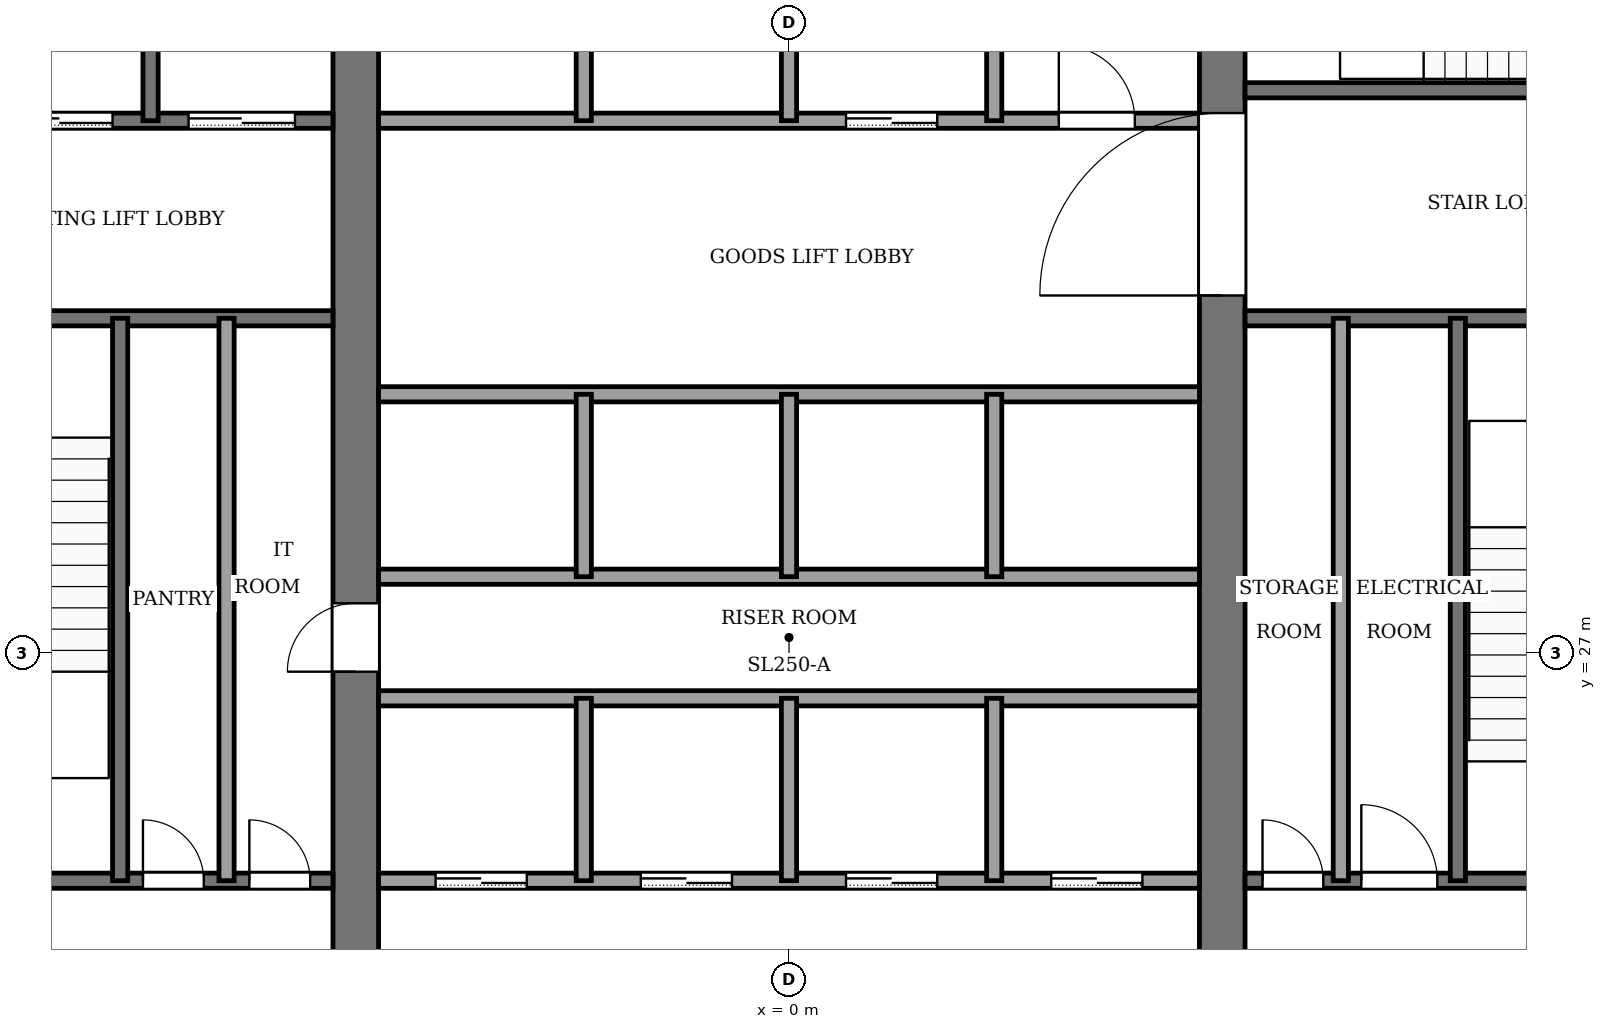
"""IFC4 building model, lengths in metres.
Left out: names, types, materials, properties, quantities, classifications, styles, units other than length and angle.
Written with IfcOpenShell. Run it as: python <this file> out.ifc"""

import sys

from ifc_helpers import new_model, si_unit, direction, frame, frame_2d, origin, place, context, subcontext, project, spatial, rectangle, extrude, element, fill, save


model = new_model("IFC4")
c1 = context("Model", 3, precision=1e-05, world=origin(), true_north=direction((0.0, 1.0)))
c2 = subcontext(c1, "Body", "Model", "MODEL_VIEW")
j1 = project(units=[si_unit("LENGTHUNIT", "METRE"), si_unit("PLANEANGLEUNIT", "RADIAN")], contexts=[c1])
p1 = place(None, origin())
s1 = spatial("IfcSite", under=j1, at=p1, CompositionType="ELEMENT")
p2 = place(p1, origin())
s2 = spatial("IfcBuilding", under=s1, at=p2, CompositionType="ELEMENT")
p3 = place(p2, frame((0.0, 0.0, 26.0)))
s3 = spatial("IfcBuildingStorey", under=s2, at=p3, CompositionType="ELEMENT", Elevation=26.0)
p4 = place(p3, frame((-5.7, 18.4, -0.13), z_axis=(0.0, 0.0, 1.0), x_axis=(0.0, 1.0, 0.0)))
e1 = element("IfcWall", 1, at=p4, inside=s3, PredefinedType="SHEAR", context=c2, shape_type="SweptSolid", body=[
    extrude(rectangle(XDim=19.2, YDim=0.6, at=frame_2d((9.6, 0.0))), origin(), (0.0, 0.0, 1.0), 4.0),
])
p5 = place(p4, frame((8.35, 0.0, 0.13)))
e2 = element("IfcOpeningElement", 2, at=p5, cuts=e1, PredefinedType="OPENING", context=c2, shape_type="SweptSolid", body=[
    extrude(rectangle(XDim=0.9, YDim=2.1, at=frame_2d((0.45, 1.05))), frame((0.0, 0.31, 0.0), z_axis=(0.0, -1.0, 0.0), x_axis=(1.0, 0.0, 0.0)), (0.0, 0.0, 1.0), 0.62),
])
p6 = place(p3, frame((5.7, 18.4, -0.13), z_axis=(0.0, 0.0, 1.0), x_axis=(0.0, 1.0, 0.0)))
e3 = element("IfcWall", 3, at=p6, inside=s3, PredefinedType="SHEAR", context=c2, shape_type="SweptSolid", body=[
    extrude(rectangle(XDim=19.2, YDim=0.6, at=frame_2d((9.6, 0.0))), origin(), (0.0, 0.0, 1.0), 4.0),
])
p7 = place(p6, frame((13.3, 0.0, 0.13)))
e4 = element("IfcOpeningElement", 4, at=p7, cuts=e3, PredefinedType="OPENING", context=c2, shape_type="SweptSolid", body=[
    extrude(rectangle(XDim=2.4, YDim=2.4, at=frame_2d((1.2, 1.2))), frame((0.0, 0.31, 0.0), z_axis=(0.0, -1.0, 0.0), x_axis=(1.0, 0.0, 0.0)), (0.0, 0.0, 1.0), 0.62),
])
p8 = place(p3, frame((-12.6, 24.0, 0.0), z_axis=(0.0, 0.0, 1.0), x_axis=(1.0, 0.0, 0.0)))
e5 = element("IfcWall", 5, at=p8, inside=s3, PredefinedType="PARTITIONING", context=c2, shape_type="SweptSolid", body=[
    extrude(rectangle(XDim=6.6, YDim=0.2, at=frame_2d((3.3, 0.0))), origin(), (0.0, 0.0, 1.0), 3.87),
])
p9 = place(p8, frame((4.1, 0.0, 0.0)))
e6 = element("IfcOpeningElement", 6, at=p9, cuts=e5, PredefinedType="OPENING", context=c2, shape_type="SweptSolid", body=[
    extrude(rectangle(XDim=0.8, YDim=2.1, at=frame_2d((0.4, 1.05))), frame((0.0, 0.11, 0.0), z_axis=(0.0, -1.0, 0.0), x_axis=(1.0, 0.0, 0.0)), (0.0, 0.0, 1.0), 0.22),
])
p10 = place(p8, frame((5.5, 0.0, 0.0)))
e7 = element("IfcOpeningElement", 7, at=p10, cuts=e5, PredefinedType="OPENING", context=c2, shape_type="SweptSolid", body=[
    extrude(rectangle(XDim=0.8, YDim=2.1, at=frame_2d((0.4, 1.05))), frame((0.0, 0.11, 0.0), z_axis=(0.0, -1.0, 0.0), x_axis=(1.0, 0.0, 0.0)), (0.0, 0.0, 1.0), 0.22),
])
p11 = place(p3, frame((-5.4, 24.0, 0.0), z_axis=(0.0, 0.0, 1.0), x_axis=(1.0, 0.0, 0.0)))
e8 = element("IfcWall", 8, at=p11, inside=s3, PredefinedType="PARTITIONING", context=c2, shape_type="SweptSolid", body=[
    extrude(rectangle(XDim=10.8, YDim=0.2, at=frame_2d((5.4, 0.0))), origin(), (0.0, 0.0, 1.0), 3.87),
])
p12 = place(p11, frame((0.75, 0.0, 0.0)))
e9 = element("IfcOpeningElement", 9, at=p12, cuts=e8, PredefinedType="OPENING", context=c2, shape_type="SweptSolid", body=[
    extrude(rectangle(XDim=1.2, YDim=2.2, at=frame_2d((0.6, 1.1))), frame((0.0, 0.11, 0.0), z_axis=(0.0, -1.0, 0.0), x_axis=(1.0, 0.0, 0.0)), (0.0, 0.0, 1.0), 0.22),
])
p13 = place(p11, frame((3.45, 0.0, 0.0)))
e10 = element("IfcOpeningElement", 10, at=p13, cuts=e8, PredefinedType="OPENING", context=c2, shape_type="SweptSolid", body=[
    extrude(rectangle(XDim=1.2, YDim=2.2, at=frame_2d((0.6, 1.1))), frame((0.0, 0.11, 0.0), z_axis=(0.0, -1.0, 0.0), x_axis=(1.0, 0.0, 0.0)), (0.0, 0.0, 1.0), 0.22),
])
p14 = place(p11, frame((6.15, 0.0, 0.0)))
e11 = element("IfcOpeningElement", 11, at=p14, cuts=e8, PredefinedType="OPENING", context=c2, shape_type="SweptSolid", body=[
    extrude(rectangle(XDim=1.2, YDim=2.2, at=frame_2d((0.6, 1.1))), frame((0.0, 0.11, 0.0), z_axis=(0.0, -1.0, 0.0), x_axis=(1.0, 0.0, 0.0)), (0.0, 0.0, 1.0), 0.22),
])
p15 = place(p11, frame((8.85, 0.0, 0.0)))
e12 = element("IfcOpeningElement", 12, at=p15, cuts=e8, PredefinedType="OPENING", context=c2, shape_type="SweptSolid", body=[
    extrude(rectangle(XDim=1.2, YDim=2.2, at=frame_2d((0.6, 1.1))), frame((0.0, 0.11, 0.0), z_axis=(0.0, -1.0, 0.0), x_axis=(1.0, 0.0, 0.0)), (0.0, 0.0, 1.0), 0.22),
])
p16 = place(p3, frame((6.0, 24.0, 0.0), z_axis=(0.0, 0.0, 1.0), x_axis=(1.0, 0.0, 0.0)))
e13 = element("IfcWall", 13, at=p16, inside=s3, PredefinedType="PARTITIONING", context=c2, shape_type="SweptSolid", body=[
    extrude(rectangle(XDim=6.6, YDim=0.2, at=frame_2d((3.3, 0.0))), origin(), (0.0, 0.0, 1.0), 3.87),
])
p17 = place(p16, frame((0.23, 0.0, 0.0)))
e14 = element("IfcOpeningElement", 14, at=p17, cuts=e13, PredefinedType="OPENING", context=c2, shape_type="SweptSolid", body=[
    extrude(rectangle(XDim=0.8, YDim=2.1, at=frame_2d((0.4, 1.05))), frame((0.0, 0.11, 0.0), z_axis=(0.0, -1.0, 0.0), x_axis=(1.0, 0.0, 0.0)), (0.0, 0.0, 1.0), 0.22),
])
p18 = place(p16, frame((1.53, 0.0, 0.0)))
e15 = element("IfcOpeningElement", 15, at=p18, cuts=e13, PredefinedType="OPENING", context=c2, shape_type="SweptSolid", body=[
    extrude(rectangle(XDim=1.0, YDim=2.1, at=frame_2d((0.5, 1.05))), frame((0.0, 0.11, 0.0), z_axis=(0.0, -1.0, 0.0), x_axis=(1.0, 0.0, 0.0)), (0.0, 0.0, 1.0), 0.22),
])
p19 = place(p16, frame((4.4, 0.0, 0.0)))
e16 = element("IfcOpeningElement", 16, at=p19, cuts=e13, PredefinedType="OPENING", context=c2, shape_type="SweptSolid", body=[
    extrude(rectangle(XDim=1.2, YDim=2.2, at=frame_2d((0.6, 1.1))), frame((0.0, 0.11, 0.0), z_axis=(0.0, -1.0, 0.0), x_axis=(1.0, 0.0, 0.0)), (0.0, 0.0, 1.0), 0.22),
])
for number, where, z_axis, x_axis in (
    (17, (-5.4, 26.4, 0.0), (0.0, 0.0, 1.0), (1.0, 0.0, 0.0)),
    (18, (-5.4, 28.0, 0.0), (0.0, 0.0, 1.0), (1.0, 0.0, 0.0)),
    (19, (-5.4, 30.4, 0.0), (0.0, 0.0, 1.0), (1.0, 0.0, 0.0)),
):
    element("IfcWall", number, at=place(p3, frame(where, z_axis=z_axis, x_axis=x_axis)), inside=s3, PredefinedType="PARTITIONING", context=c2, shape_type="SweptSolid", body=[
        extrude(rectangle(XDim=10.8, YDim=0.2, at=frame_2d((5.4, 0.0))), origin(), (0.0, 0.0, 1.0), 3.87),
    ])
p20 = place(p3, frame((-12.6, 31.4, 0.0), z_axis=(0.0, 0.0, 1.0), x_axis=(1.0, 0.0, 0.0)))
e20 = element("IfcWall", 20, at=p20, inside=s3, PredefinedType="PARTITIONING", context=c2, shape_type="SweptSolid", body=[
    extrude(rectangle(XDim=6.6, YDim=0.2, at=frame_2d((3.3, 0.0))), origin(), (0.0, 0.0, 1.0), 3.87),
])
p21 = place(p20, frame((1.0, 0.0, 0.0)))
e21 = element("IfcOpeningElement", 21, at=p21, cuts=e20, PredefinedType="OPENING", context=c2, shape_type="SweptSolid", body=[
    extrude(rectangle(XDim=1.2, YDim=2.2, at=frame_2d((0.6, 1.1))), frame((0.0, 0.11, 0.0), z_axis=(0.0, -1.0, 0.0), x_axis=(1.0, 0.0, 0.0)), (0.0, 0.0, 1.0), 0.22),
])
p22 = place(p3, frame((6.0, 31.4, 0.0), z_axis=(0.0, 0.0, 1.0), x_axis=(1.0, 0.0, 0.0)))
e22 = element("IfcWall", 22, at=p22, inside=s3, PredefinedType="PARTITIONING", context=c2, shape_type="SweptSolid", body=[
    extrude(rectangle(XDim=6.6, YDim=0.2, at=frame_2d((3.3, 0.0))), origin(), (0.0, 0.0, 1.0), 3.87),
])
p23 = place(p3, frame((-12.6, 34.0, 0.0), z_axis=(0.0, 0.0, 1.0), x_axis=(1.0, 0.0, 0.0)))
e23 = element("IfcWall", 23, at=p23, inside=s3, PredefinedType="PARTITIONING", context=c2, shape_type="SweptSolid", body=[
    extrude(rectangle(XDim=6.6, YDim=0.2, at=frame_2d((3.3, 0.0))), origin(), (0.0, 0.0, 1.0), 3.87),
])
p24 = place(p23, frame((4.7, 0.0, 0.0)))
e24 = element("IfcOpeningElement", 24, at=p24, cuts=e23, PredefinedType="OPENING", context=c2, shape_type="SweptSolid", body=[
    extrude(rectangle(XDim=1.4, YDim=2.2, at=frame_2d((0.7, 1.1))), frame((0.0, 0.11, 0.0), z_axis=(0.0, -1.0, 0.0), x_axis=(1.0, 0.0, 0.0)), (0.0, 0.0, 1.0), 0.22),
])
p25 = place(p23, frame((2.3, 0.0, 0.0)))
e25 = element("IfcOpeningElement", 25, at=p25, cuts=e23, PredefinedType="OPENING", context=c2, shape_type="SweptSolid", body=[
    extrude(rectangle(XDim=1.4, YDim=2.2, at=frame_2d((0.7, 1.1))), frame((0.0, 0.11, 0.0), z_axis=(0.0, -1.0, 0.0), x_axis=(1.0, 0.0, 0.0)), (0.0, 0.0, 1.0), 0.22),
])
p26 = place(p23, frame((0.45, 0.0, 0.0)))
e26 = element("IfcOpeningElement", 26, at=p26, cuts=e23, PredefinedType="OPENING", context=c2, shape_type="SweptSolid", body=[
    extrude(rectangle(XDim=0.9, YDim=2.1, at=frame_2d((0.45, 1.05))), frame((0.0, 0.11, 0.0), z_axis=(0.0, -1.0, 0.0), x_axis=(1.0, 0.0, 0.0)), (0.0, 0.0, 1.0), 0.22),
])
p27 = place(p3, frame((-5.4, 34.0, 0.0), z_axis=(0.0, 0.0, 1.0), x_axis=(1.0, 0.0, 0.0)))
e27 = element("IfcWall", 27, at=p27, inside=s3, PredefinedType="PARTITIONING", context=c2, shape_type="SweptSolid", body=[
    extrude(rectangle(XDim=10.8, YDim=0.2, at=frame_2d((5.4, 0.0))), origin(), (0.0, 0.0, 1.0), 3.87),
])
p28 = place(p27, frame((6.15, 0.0, 0.0)))
e28 = element("IfcOpeningElement", 28, at=p28, cuts=e27, PredefinedType="OPENING", context=c2, shape_type="SweptSolid", body=[
    extrude(rectangle(XDim=1.2, YDim=2.2, at=frame_2d((0.6, 1.1))), frame((0.0, 0.11, 0.0), z_axis=(0.0, -1.0, 0.0), x_axis=(1.0, 0.0, 0.0)), (0.0, 0.0, 1.0), 0.22),
])
p29 = place(p27, frame((8.95, 0.0, 0.0)))
e29 = element("IfcOpeningElement", 29, at=p29, cuts=e27, PredefinedType="OPENING", context=c2, shape_type="SweptSolid", body=[
    extrude(rectangle(XDim=1.0, YDim=2.1, at=frame_2d((0.5, 1.05))), frame((0.0, 0.11, 0.0), z_axis=(0.0, -1.0, 0.0), x_axis=(1.0, 0.0, 0.0)), (0.0, 0.0, 1.0), 0.22),
])
p30 = place(p3, frame((6.0, 34.4, 0.0), z_axis=(0.0, 0.0, 1.0), x_axis=(1.0, 0.0, 0.0)))
e30 = element("IfcWall", 30, at=p30, inside=s3, PredefinedType="PARTITIONING", context=c2, shape_type="SweptSolid", body=[
    extrude(rectangle(XDim=6.6, YDim=0.2, at=frame_2d((3.3, 0.0))), origin(), (0.0, 0.0, 1.0), 3.87),
])
p31 = place(p30, frame((4.8, 0.0, 0.0)))
e31 = element("IfcOpeningElement", 31, at=p31, cuts=e30, PredefinedType="OPENING", context=c2, shape_type="SweptSolid", body=[
    extrude(rectangle(XDim=1.2, YDim=2.2, at=frame_2d((0.6, 1.1))), frame((0.0, 0.11, 0.0), z_axis=(0.0, -1.0, 0.0), x_axis=(1.0, 0.0, 0.0)), (0.0, 0.0, 1.0), 0.22),
])
p32 = place(p3, frame((-8.8, 24.0, 0.0), z_axis=(0.0, 0.0, 1.0), x_axis=(0.0, 1.0, 0.0)))
e32 = element("IfcWall", 32, at=p32, inside=s3, PredefinedType="PARTITIONING", context=c2, shape_type="SweptSolid", body=[
    extrude(rectangle(XDim=7.4, YDim=0.2, at=frame_2d((3.7, 0.0))), origin(), (0.0, 0.0, 1.0), 3.87),
])
p33 = place(p3, frame((-8.4, 34.0, 0.0), z_axis=(0.0, 0.0, 1.0), x_axis=(0.0, 1.0, 0.0)))
e33 = element("IfcWall", 33, at=p33, inside=s3, PredefinedType="PARTITIONING", context=c2, shape_type="SweptSolid", body=[
    extrude(rectangle(XDim=3.6, YDim=0.2, at=frame_2d((1.8, 0.0))), origin(), (0.0, 0.0, 1.0), 3.87),
])
p34 = place(p3, frame((-7.4, 24.0, 0.0), z_axis=(0.0, 0.0, 1.0), x_axis=(0.0, 1.0, 0.0)))
e34 = element("IfcWall", 34, at=p34, inside=s3, PredefinedType="PARTITIONING", context=c2, shape_type="SweptSolid", body=[
    extrude(rectangle(XDim=7.4, YDim=0.2, at=frame_2d((3.7, 0.0))), origin(), (0.0, 0.0, 1.0), 3.87),
])
for number, where, z_axis, x_axis in (
    (35, (-2.7, 24.0, 0.0), (0.0, 0.0, 1.0), (0.0, 1.0, 0.0)),
    (36, (-2.7, 28.0, 0.0), (0.0, 0.0, 1.0), (0.0, 1.0, 0.0)),
):
    element("IfcWall", number, at=place(p3, frame(where, z_axis=z_axis, x_axis=x_axis)), inside=s3, PredefinedType="PARTITIONING", context=c2, shape_type="SweptSolid", body=[
        extrude(rectangle(XDim=2.4, YDim=0.2, at=frame_2d((1.2, 0.0))), origin(), (0.0, 0.0, 1.0), 3.87),
    ])
p35 = place(p3, frame((-2.7, 34.0, 0.0), z_axis=(0.0, 0.0, 1.0), x_axis=(0.0, 1.0, 0.0)))
e37 = element("IfcWall", 37, at=p35, inside=s3, PredefinedType="PARTITIONING", context=c2, shape_type="SweptSolid", body=[
    extrude(rectangle(XDim=3.6, YDim=0.2, at=frame_2d((1.8, 0.0))), origin(), (0.0, 0.0, 1.0), 3.87),
])
for number, where, z_axis, x_axis in (
    (38, (0.0, 24.0, 0.0), (0.0, 0.0, 1.0), (0.0, 1.0, 0.0)),
    (39, (0.0, 28.0, 0.0), (0.0, 0.0, 1.0), (0.0, 1.0, 0.0)),
):
    element("IfcWall", number, at=place(p3, frame(where, z_axis=z_axis, x_axis=x_axis)), inside=s3, PredefinedType="PARTITIONING", context=c2, shape_type="SweptSolid", body=[
        extrude(rectangle(XDim=2.4, YDim=0.2, at=frame_2d((1.2, 0.0))), origin(), (0.0, 0.0, 1.0), 3.87),
    ])
p36 = place(p3, frame((0.0, 34.0, 0.0), z_axis=(0.0, 0.0, 1.0), x_axis=(0.0, 1.0, 0.0)))
e40 = element("IfcWall", 40, at=p36, inside=s3, PredefinedType="PARTITIONING", context=c2, shape_type="SweptSolid", body=[
    extrude(rectangle(XDim=3.6, YDim=0.2, at=frame_2d((1.8, 0.0))), origin(), (0.0, 0.0, 1.0), 3.87),
])
for number, where, z_axis, x_axis in (
    (41, (2.7, 24.0, 0.0), (0.0, 0.0, 1.0), (0.0, 1.0, 0.0)),
    (42, (2.7, 28.0, 0.0), (0.0, 0.0, 1.0), (0.0, 1.0, 0.0)),
):
    element("IfcWall", number, at=place(p3, frame(where, z_axis=z_axis, x_axis=x_axis)), inside=s3, PredefinedType="PARTITIONING", context=c2, shape_type="SweptSolid", body=[
        extrude(rectangle(XDim=2.4, YDim=0.2, at=frame_2d((1.2, 0.0))), origin(), (0.0, 0.0, 1.0), 3.87),
    ])
p37 = place(p3, frame((2.7, 34.0, 0.0), z_axis=(0.0, 0.0, 1.0), x_axis=(0.0, 1.0, 0.0)))
e43 = element("IfcWall", 43, at=p37, inside=s3, PredefinedType="PARTITIONING", context=c2, shape_type="SweptSolid", body=[
    extrude(rectangle(XDim=3.6, YDim=0.2, at=frame_2d((1.8, 0.0))), origin(), (0.0, 0.0, 1.0), 3.87),
])
for number, where, z_axis, x_axis in (
    (44, (7.26, 24.0, 0.0), (0.0, 0.0, 1.0), (0.0, 1.0, 0.0)),
    (45, (8.8, 24.0, 0.0), (0.0, 0.0, 1.0), (0.0, 1.0, 0.0)),
):
    element("IfcWall", number, at=place(p3, frame(where, z_axis=z_axis, x_axis=x_axis)), inside=s3, PredefinedType="PARTITIONING", context=c2, shape_type="SweptSolid", body=[
        extrude(rectangle(XDim=7.4, YDim=0.2, at=frame_2d((3.7, 0.0))), origin(), (0.0, 0.0, 1.0), 3.87),
    ])
p38 = place(p12, origin())
e46 = element("IfcDoor", 46, at=p38, inside=s3, OperationType="SLIDING_TO_LEFT", PredefinedType="DOOR", context=c2, shape_type="SweptSolid", body=[
    extrude(rectangle(XDim=1.2, YDim=2.2, at=frame_2d((0.6, 1.1))), frame((0.0, 0.025, 0.0), z_axis=(0.0, -1.0, 0.0), x_axis=(1.0, 0.0, 0.0)), (0.0, 0.0, 1.0), 0.05),
])
fill(e9, e46)
p39 = place(p13, origin())
e47 = element("IfcDoor", 47, at=p39, inside=s3, OperationType="SLIDING_TO_LEFT", PredefinedType="DOOR", context=c2, shape_type="SweptSolid", body=[
    extrude(rectangle(XDim=1.2, YDim=2.2, at=frame_2d((0.6, 1.1))), frame((0.0, 0.025, 0.0), z_axis=(0.0, -1.0, 0.0), x_axis=(1.0, 0.0, 0.0)), (0.0, 0.0, 1.0), 0.05),
])
fill(e10, e47)
p40 = place(p14, origin())
e48 = element("IfcDoor", 48, at=p40, inside=s3, OperationType="SLIDING_TO_LEFT", PredefinedType="DOOR", context=c2, shape_type="SweptSolid", body=[
    extrude(rectangle(XDim=1.2, YDim=2.2, at=frame_2d((0.6, 1.1))), frame((0.0, 0.025, 0.0), z_axis=(0.0, -1.0, 0.0), x_axis=(1.0, 0.0, 0.0)), (0.0, 0.0, 1.0), 0.05),
])
fill(e11, e48)
p41 = place(p15, origin())
e49 = element("IfcDoor", 49, at=p41, inside=s3, OperationType="SLIDING_TO_LEFT", PredefinedType="DOOR", context=c2, shape_type="SweptSolid", body=[
    extrude(rectangle(XDim=1.2, YDim=2.2, at=frame_2d((0.6, 1.1))), frame((0.0, 0.025, 0.0), z_axis=(0.0, -1.0, 0.0), x_axis=(1.0, 0.0, 0.0)), (0.0, 0.0, 1.0), 0.05),
])
fill(e12, e49)
p42 = place(p28, origin())
e50 = element("IfcDoor", 50, at=p42, inside=s3, OperationType="SLIDING_TO_LEFT", PredefinedType="DOOR", context=c2, shape_type="SweptSolid", body=[
    extrude(rectangle(XDim=1.2, YDim=2.2, at=frame_2d((0.6, 1.1))), frame((0.0, 0.025, 0.0), z_axis=(0.0, -1.0, 0.0), x_axis=(1.0, 0.0, 0.0)), (0.0, 0.0, 1.0), 0.05),
])
fill(e28, e50)
p43 = place(p24, origin())
e51 = element("IfcDoor", 51, at=p43, inside=s3, OperationType="SLIDING_TO_LEFT", PredefinedType="DOOR", context=c2, shape_type="SweptSolid", body=[
    extrude(rectangle(XDim=1.4, YDim=2.2, at=frame_2d((0.7, 1.1))), frame((0.0, 0.025, 0.0), z_axis=(0.0, -1.0, 0.0), x_axis=(1.0, 0.0, 0.0)), (0.0, 0.0, 1.0), 0.05),
])
fill(e24, e51)
p44 = place(p25, origin())
e52 = element("IfcDoor", 52, at=p44, inside=s3, OperationType="SLIDING_TO_LEFT", PredefinedType="DOOR", context=c2, shape_type="SweptSolid", body=[
    extrude(rectangle(XDim=1.4, YDim=2.2, at=frame_2d((0.7, 1.1))), frame((0.0, 0.025, 0.0), z_axis=(0.0, -1.0, 0.0), x_axis=(1.0, 0.0, 0.0)), (0.0, 0.0, 1.0), 0.05),
])
fill(e25, e52)
p45 = place(p9, origin())
e53 = element("IfcDoor", 53, at=p45, inside=s3, OperationType="SINGLE_SWING_LEFT", PredefinedType="DOOR", context=c2, shape_type="SweptSolid", body=[
    extrude(rectangle(XDim=0.8, YDim=2.1, at=frame_2d((0.4, 1.05))), frame((0.0, 0.025, 0.0), z_axis=(0.0, -1.0, 0.0), x_axis=(1.0, 0.0, 0.0)), (0.0, 0.0, 1.0), 0.05),
])
fill(e6, e53)
p46 = place(p10, origin())
e54 = element("IfcDoor", 54, at=p46, inside=s3, OperationType="SINGLE_SWING_RIGHT", PredefinedType="DOOR", context=c2, shape_type="SweptSolid", body=[
    extrude(rectangle(XDim=0.8, YDim=2.1, at=frame_2d((0.4, 1.05))), frame((0.0, 0.025, 0.0), z_axis=(0.0, -1.0, 0.0), x_axis=(1.0, 0.0, 0.0)), (0.0, 0.0, 1.0), 0.05),
])
fill(e7, e54)
p47 = place(p17, origin())
e55 = element("IfcDoor", 55, at=p47, inside=s3, OperationType="SINGLE_SWING_RIGHT", PredefinedType="DOOR", context=c2, shape_type="SweptSolid", body=[
    extrude(rectangle(XDim=0.8, YDim=2.1, at=frame_2d((0.4, 1.05))), frame((0.0, 0.025, 0.0), z_axis=(0.0, -1.0, 0.0), x_axis=(1.0, 0.0, 0.0)), (0.0, 0.0, 1.0), 0.05),
])
fill(e14, e55)
p48 = place(p18, origin())
e56 = element("IfcDoor", 56, at=p48, inside=s3, OperationType="SINGLE_SWING_LEFT", PredefinedType="DOOR", context=c2, shape_type="SweptSolid", body=[
    extrude(rectangle(XDim=1.0, YDim=2.1, at=frame_2d((0.5, 1.05))), frame((0.0, 0.025, 0.0), z_axis=(0.0, -1.0, 0.0), x_axis=(1.0, 0.0, 0.0)), (0.0, 0.0, 1.0), 0.05),
])
fill(e15, e56)
p49 = place(p29, origin())
e57 = element("IfcDoor", 57, at=p49, inside=s3, OperationType="SINGLE_SWING_LEFT", PredefinedType="DOOR", context=c2, shape_type="SweptSolid", body=[
    extrude(rectangle(XDim=1.0, YDim=2.1, at=frame_2d((0.5, 1.05))), frame((0.0, 0.025, 0.0), z_axis=(0.0, -1.0, 0.0), x_axis=(1.0, 0.0, 0.0)), (0.0, 0.0, 1.0), 0.05),
])
fill(e29, e57)
p50 = place(p5, origin())
e58 = element("IfcDoor", 58, at=p50, inside=s3, OperationType="SINGLE_SWING_RIGHT", PredefinedType="DOOR", context=c2, shape_type="SweptSolid", body=[
    extrude(rectangle(XDim=0.9, YDim=2.1, at=frame_2d((0.45, 1.05))), frame((0.0, 0.025, 0.0), z_axis=(0.0, -1.0, 0.0), x_axis=(1.0, 0.0, 0.0)), (0.0, 0.0, 1.0), 0.05),
])
fill(e2, e58)
p51 = place(p7, origin())
e59 = element("IfcDoor", 59, at=p51, inside=s3, OperationType="DOUBLE_DOOR_SINGLE_SWING", PredefinedType="DOOR", context=c2, shape_type="SweptSolid", body=[
    extrude(rectangle(XDim=2.4, YDim=2.4, at=frame_2d((1.2, 1.2))), frame((0.0, 0.025, 0.0), z_axis=(0.0, -1.0, 0.0), x_axis=(1.0, 0.0, 0.0)), (0.0, 0.0, 1.0), 0.05),
])
fill(e4, e59)
save(model, sys.argv[1])
